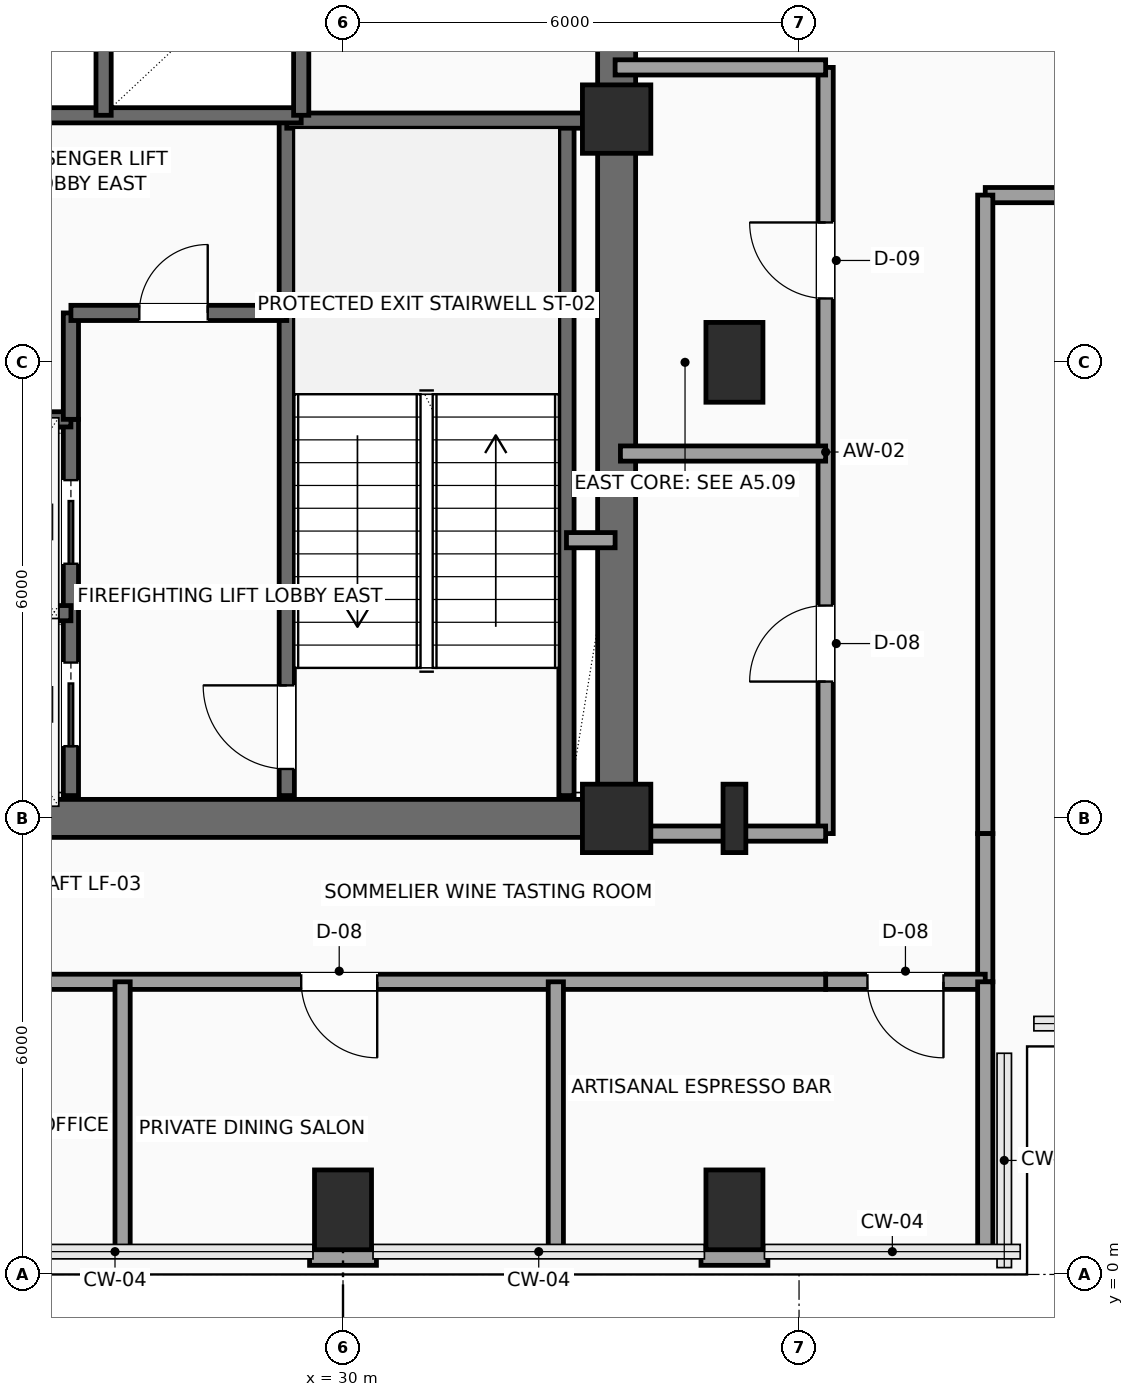
"""IFC4 building model, lengths in metres.
Left out: names, types, materials, properties, quantities, classifications, styles, units other than length and angle.
Written with IfcOpenShell. Run it as: python <this file> out.ifc"""

import sys

from ifc_helpers import new_model, si_unit, direction, frame, frame_2d, origin, origin_2d, place, context, subcontext, project, spatial, rectangle, i_section, extrude, element, fill, save


model = new_model("IFC4")
c1 = context("Model", 3, precision=1e-05, world=origin(), true_north=direction((0.0, 1.0)))
c2 = subcontext(c1, "Body", "Model", "MODEL_VIEW")
j1 = project(units=[si_unit("LENGTHUNIT", "METRE"), si_unit("PLANEANGLEUNIT", "RADIAN")], contexts=[c1])
p1 = place(None, origin())
s1 = spatial("IfcSite", under=j1, at=p1, CompositionType="ELEMENT")
p2 = place(p1, origin())
s2 = spatial("IfcBuilding", under=s1, at=p2, CompositionType="ELEMENT")
p3 = place(p2, frame((0.0, 0.0, 172.95)))
s3 = spatial("IfcBuildingStorey", under=s2, at=p3, CompositionType="ELEMENT", Elevation=172.95)
for number, where, z_axis, x_axis in (
    (1, (33.6, 6.0, 0.0), (0.0, 0.0, 1.0), (1.0, 0.0, 0.0)),
    (2, (33.6, 15.2, 0.0), (0.0, 0.0, 1.0), (1.0, 0.0, 0.0)),
):
    element("IfcColumn", number, at=place(p3, frame(where, z_axis=z_axis, x_axis=x_axis)), inside=s3, PredefinedType="COLUMN", context=c2, shape_type="SweptSolid", body=[
        extrude(rectangle(XDim=0.9, YDim=0.9, at=origin_2d()), origin(), (0.0, 0.0, 1.0), 3.75),
    ])
for number, where, z_axis, x_axis in (
    (3, (30.0, 0.85, 0.0), (0.0, 0.0, 1.0), (1.0, 0.0, 0.0)),
    (4, (35.15, 0.85, 0.0), (0.0, 0.0, 1.0), (1.0, 0.0, 0.0)),
):
    element("IfcColumn", number, at=place(p3, frame(where, z_axis=z_axis, x_axis=x_axis)), inside=s3, PredefinedType="COLUMN", context=c2, shape_type="SweptSolid", body=[
        extrude(rectangle(XDim=0.75, YDim=1.05, at=origin_2d()), origin(), (0.0, 0.0, 1.0), 3.75),
    ])
p4 = place(p3, frame((35.15, 6.0, 0.0), z_axis=(0.0, 0.0, 1.0), x_axis=(1.0, 0.0, 0.0)))
e5 = element("IfcColumn", 5, at=p4, inside=s3, PredefinedType="COLUMN", context=c2, shape_type="SweptSolid", body=[
    extrude(i_section(OverallWidth=0.3, OverallDepth=0.9, WebThickness=0.019, FlangeThickness=0.035, FilletRadius=0.03, at=origin_2d()), origin(), (0.0, 0.0, 1.0), 3.75),
])
p5 = place(p3, frame((35.15, 12.0, 0.0), z_axis=(0.0, 0.0, 1.0), x_axis=(1.0, 0.0, 0.0)))
e6 = element("IfcColumn", 6, at=p5, inside=s3, PredefinedType="COLUMN", context=c2, shape_type="SweptSolid", body=[
    extrude(rectangle(XDim=0.75, YDim=1.05, at=origin_2d()), origin(), (0.0, 0.0, 1.0), 3.75),
])
p6 = place(p3, frame((35.59, 0.24, 0.0), z_axis=(0.0, 0.0, 1.0), x_axis=(-1.0, 0.0, 0.0)))
e7 = element("IfcWall", 7, at=p6, inside=s3, PredefinedType="SOLIDWALL", context=c2, shape_type="SweptSolid", body=[
    extrude(rectangle(XDim=0.88, YDim=0.24, at=frame_2d((0.44, 0.0))), origin(), (0.0, 0.0, 1.0), 3.54),
])
p7 = place(p3, frame((30.44, 0.24, 0.0), z_axis=(0.0, 0.0, 1.0), x_axis=(-1.0, 0.0, 0.0)))
e8 = element("IfcWall", 8, at=p7, inside=s3, PredefinedType="SOLIDWALL", context=c2, shape_type="SweptSolid", body=[
    extrude(rectangle(XDim=0.88, YDim=0.24, at=frame_2d((0.44, 0.0))), origin(), (0.0, 0.0, 1.0), 3.54),
])
p8 = place(p3, frame((24.0, 6.0, 0.0), z_axis=(0.0, 0.0, 1.0), x_axis=(1.0, 0.0, 0.0)))
e9 = element("IfcWall", 9, at=p8, inside=s3, PredefinedType="SHEAR", context=c2, shape_type="SweptSolid", body=[
    extrude(rectangle(XDim=9.6, YDim=0.5, at=frame_2d((4.8, 0.0))), origin(), (0.0, 0.0, 1.0), 3.54),
])
p9 = place(p3, frame((33.6, 6.0, 0.0), z_axis=(0.0, 0.0, 1.0), x_axis=(0.0, 1.0, 0.0)))
e10 = element("IfcWall", 10, at=p9, inside=s3, PredefinedType="SHEAR", context=c2, shape_type="SweptSolid", body=[
    extrude(rectangle(XDim=12.0, YDim=0.5, at=frame_2d((6.0, 0.0))), origin(), (0.0, 0.0, 1.0), 3.54),
])
p10 = place(p9, frame((10.15, 0.0, 0.0)))
e11 = element("IfcOpeningElement", 11, at=p10, cuts=e10, PredefinedType="OPENING", context=c2, shape_type="SweptSolid", body=[
    extrude(rectangle(XDim=0.9, YDim=2.15, at=frame_2d((0.45, 1.075))), frame((0.0, 0.26, 0.0), z_axis=(0.0, -1.0, 0.0), x_axis=(1.0, 0.0, 0.0)), (0.0, 0.0, 1.0), 0.52),
])
p11 = place(p3, frame((29.26, 6.3, 0.0), z_axis=(0.0, 0.0, 1.0), x_axis=(0.0, 1.0, 0.0)))
e12 = element("IfcWall", 12, at=p11, inside=s3, PredefinedType="SHEAR", context=c2, shape_type="SweptSolid", body=[
    extrude(rectangle(XDim=8.88, YDim=0.2, at=frame_2d((4.44, 0.0))), origin(), (0.0, 0.0, 1.0), 3.54),
])
p12 = place(p11, frame((0.35, 0.0, 0.0)))
e13 = element("IfcOpeningElement", 13, at=p12, cuts=e12, PredefinedType="OPENING", context=c2, shape_type="SweptSolid", body=[
    extrude(rectangle(XDim=1.1, YDim=2.2, at=frame_2d((0.55, 1.1))), frame((0.0, 0.11, 0.0), z_axis=(0.0, -1.0, 0.0), x_axis=(1.0, 0.0, 0.0)), (0.0, 0.0, 1.0), 0.22),
])
p13 = place(p3, frame((32.94, 6.3, 0.0), z_axis=(0.0, 0.0, 1.0), x_axis=(0.0, 1.0, 0.0)))
e14 = element("IfcWall", 14, at=p13, inside=s3, PredefinedType="SHEAR", context=c2, shape_type="SweptSolid", body=[
    extrude(rectangle(XDim=8.88, YDim=0.2, at=frame_2d((4.44, 0.0))), origin(), (0.0, 0.0, 1.0), 3.54),
])
p14 = place(p3, frame((29.26, 15.18, 0.0), z_axis=(0.0, 0.0, 1.0), x_axis=(1.0, 0.0, 0.0)))
e15 = element("IfcWall", 15, at=p14, inside=s3, PredefinedType="SHEAR", context=c2, shape_type="SweptSolid", body=[
    extrude(rectangle(XDim=4.04, YDim=0.2, at=frame_2d((2.02, 0.0))), origin(), (0.0, 0.0, 1.0), 3.54),
])
p15 = place(p3, frame((26.42, 6.3, 0.0), z_axis=(0.0, 0.0, 1.0), x_axis=(0.0, 1.0, 0.0)))
e16 = element("IfcWall", 16, at=p15, inside=s3, PredefinedType="SHEAR", context=c2, shape_type="SweptSolid", body=[
    extrude(rectangle(XDim=4.95, YDim=0.2, at=frame_2d((2.475, 0.0))), origin(), (0.0, 0.0, 1.0), 3.54),
])
p16 = place(p15, frame((0.65, 0.0, 0.0)))
e17 = element("IfcOpeningElement", 17, at=p16, cuts=e16, PredefinedType="OPENING", context=c2, shape_type="SweptSolid", body=[
    extrude(rectangle(XDim=1.1, YDim=2.2, at=frame_2d((0.55, 1.1))), frame((0.0, 0.11, 0.0), z_axis=(0.0, -1.0, 0.0), x_axis=(1.0, 0.0, 0.0)), (0.0, 0.0, 1.0), 0.22),
])
p17 = place(p15, frame((3.05, 0.0, 0.0)))
e18 = element("IfcOpeningElement", 18, at=p17, cuts=e16, PredefinedType="OPENING", context=c2, shape_type="SweptSolid", body=[
    extrude(rectangle(XDim=1.1, YDim=2.2, at=frame_2d((0.55, 1.1))), frame((0.0, 0.11, 0.0), z_axis=(0.0, -1.0, 0.0), x_axis=(1.0, 0.0, 0.0)), (0.0, 0.0, 1.0), 0.22),
])
for number, where, z_axis, x_axis in (
    (19, (24.25, 8.7, 0.0), (0.0, 0.0, 1.0), (1.0, 0.0, 0.0)),
    (20, (24.25, 11.25, 0.0), (0.0, 0.0, 1.0), (1.0, 0.0, 0.0)),
):
    element("IfcWall", number, at=place(p3, frame(where, z_axis=z_axis, x_axis=x_axis)), inside=s3, PredefinedType="SHEAR", context=c2, shape_type="SweptSolid", body=[
        extrude(rectangle(XDim=2.17, YDim=0.2, at=frame_2d((1.085, 0.0))), origin(), (0.0, 0.0, 1.0), 3.54),
    ])
p18 = place(p3, frame((26.42, 11.25, 0.0), z_axis=(0.0, 0.0, 1.0), x_axis=(0.0, 1.0, 0.0)))
e21 = element("IfcWall", 21, at=p18, inside=s3, PredefinedType="SHEAR", context=c2, shape_type="SweptSolid", body=[
    extrude(rectangle(XDim=1.4, YDim=0.2, at=frame_2d((0.7, 0.0))), origin(), (0.0, 0.0, 1.0), 3.54),
])
p19 = place(p3, frame((26.42, 12.65, 0.0), z_axis=(0.0, 0.0, 1.0), x_axis=(1.0, 0.0, 0.0)))
e22 = element("IfcWall", 22, at=p19, inside=s3, PredefinedType="SHEAR", context=c2, shape_type="SweptSolid", body=[
    extrude(rectangle(XDim=2.84, YDim=0.2, at=frame_2d((1.42, 0.0))), origin(), (0.0, 0.0, 1.0), 3.54),
])
p20 = place(p19, frame((0.9, 0.0, 0.0)))
e23 = element("IfcOpeningElement", 23, at=p20, cuts=e22, PredefinedType="OPENING", context=c2, shape_type="SweptSolid", body=[
    extrude(rectangle(XDim=0.9, YDim=2.15, at=frame_2d((0.45, 1.075))), frame((0.0, 0.11, 0.0), z_axis=(0.0, -1.0, 0.0), x_axis=(1.0, 0.0, 0.0)), (0.0, 0.0, 1.0), 0.22),
])
p21 = place(p3, frame((32.94, 9.66, 0.0), z_axis=(0.0, 0.0, 1.0), x_axis=(1.0, 0.0, 0.0)))
e24 = element("IfcWall", 24, at=p21, inside=s3, PredefinedType="SOLIDWALL", context=c2, shape_type="SweptSolid", body=[
    extrude(rectangle(XDim=0.64, YDim=0.2, at=frame_2d((0.32, 0.0))), origin(), (0.0, 0.0, 1.0), 3.54),
])
p22 = place(p3, frame((24.25, 15.25, 0.0), z_axis=(0.0, 0.0, 1.0), x_axis=(1.0, 0.0, 0.0)))
e25 = element("IfcWall", 25, at=p22, inside=s3, PredefinedType="SHEAR", context=c2, shape_type="SweptSolid", body=[
    extrude(rectangle(XDim=5.2, YDim=0.2, at=frame_2d((2.6, 0.0))), origin(), (0.0, 0.0, 1.0), 3.54),
])
p23 = place(p3, frame((26.85, 15.25, 0.0), z_axis=(0.0, 0.0, 1.0), x_axis=(0.0, 1.0, 0.0)))
e26 = element("IfcWall", 26, at=p23, inside=s3, PredefinedType="SHEAR", context=c2, shape_type="SweptSolid", body=[
    extrude(rectangle(XDim=2.4, YDim=0.2, at=frame_2d((1.2, 0.0))), origin(), (0.0, 0.0, 1.0), 3.54),
])
p24 = place(p3, frame((29.45, 15.25, 0.0), z_axis=(0.0, 0.0, 1.0), x_axis=(0.0, 1.0, 0.0)))
e27 = element("IfcWall", 27, at=p24, inside=s3, PredefinedType="SHEAR", context=c2, shape_type="SweptSolid", body=[
    extrude(rectangle(XDim=2.45, YDim=0.2, at=frame_2d((1.225, 0.0))), origin(), (0.0, 0.0, 1.0), 3.54),
])
p25 = place(p3, frame((36.35, 5.8, 0.0), z_axis=(0.0, 0.0, 1.0), x_axis=(0.0, 1.0, 0.0)))
e28 = element("IfcWall", 28, at=p25, inside=s3, PredefinedType="PARTITIONING", context=c2, shape_type="SweptSolid", body=[
    extrude(rectangle(XDim=10.08, YDim=0.2, at=frame_2d((5.04, 0.0))), origin(), (0.0, 0.0, 1.0), 3.54),
])
p26 = place(p25, frame((2.0, 0.0, 0.0)))
e29 = element("IfcOpeningElement", 29, at=p26, cuts=e28, PredefinedType="OPENING", context=c2, shape_type="SweptSolid", body=[
    extrude(rectangle(XDim=1.0, YDim=2.2, at=frame_2d((0.5, 1.1))), frame((0.0, 0.11, 0.0), z_axis=(0.0, -1.0, 0.0), x_axis=(1.0, 0.0, 0.0)), (0.0, 0.0, 1.0), 0.22),
])
p27 = place(p25, frame((7.04, 0.0, 0.0)))
e30 = element("IfcOpeningElement", 30, at=p27, cuts=e28, PredefinedType="OPENING", context=c2, shape_type="SweptSolid", body=[
    extrude(rectangle(XDim=1.0, YDim=2.2, at=frame_2d((0.5, 1.1))), frame((0.0, 0.11, 0.0), z_axis=(0.0, -1.0, 0.0), x_axis=(1.0, 0.0, 0.0)), (0.0, 0.0, 1.0), 0.22),
])
p28 = place(p3, frame((36.35, 15.88, 0.0), z_axis=(0.0, 0.0, 1.0), x_axis=(-1.0, 0.0, 0.0)))
e31 = element("IfcWall", 31, at=p28, inside=s3, PredefinedType="PARTITIONING", context=c2, shape_type="SweptSolid", body=[
    extrude(rectangle(XDim=2.77, YDim=0.2, at=frame_2d((1.385, 0.0))), origin(), (0.0, 0.0, 1.0), 3.54),
])
p29 = place(p3, frame((41.7, 14.2, 0.0), z_axis=(0.0, 0.0, 1.0), x_axis=(-1.0, 0.0, 0.0)))
e32 = element("IfcWall", 32, at=p29, inside=s3, PredefinedType="PARTITIONING", context=c2, shape_type="SweptSolid", body=[
    extrude(rectangle(XDim=3.25, YDim=0.2, at=frame_2d((1.625, 0.0))), origin(), (0.0, 0.0, 1.0), 3.54),
])
p30 = place(p3, frame((38.45, 14.2, 0.0), z_axis=(0.0, 0.0, 1.0), x_axis=(0.0, -1.0, 0.0)))
e33 = element("IfcWall", 33, at=p30, inside=s3, PredefinedType="PARTITIONING", context=c2, shape_type="SweptSolid", body=[
    extrude(rectangle(XDim=8.4, YDim=0.2, at=frame_2d((4.2, 0.0))), origin(), (0.0, 0.0, 1.0), 3.54),
])
p31 = place(p3, frame((38.45, 5.8, 0.0), z_axis=(0.0, 0.0, 1.0), x_axis=(0.0, -1.0, 0.0)))
e34 = element("IfcWall", 34, at=p31, inside=s3, PredefinedType="PARTITIONING", context=c2, shape_type="SweptSolid", body=[
    extrude(rectangle(XDim=1.95, YDim=0.2, at=frame_2d((0.975, 0.0))), origin(), (0.0, 0.0, 1.0), 3.54),
])
p32 = place(p3, frame((38.45, 3.85, 0.0), z_axis=(0.0, 0.0, 1.0), x_axis=(-1.0, 0.0, 0.0)))
e35 = element("IfcWall", 35, at=p32, inside=s3, PredefinedType="PARTITIONING", context=c2, shape_type="SweptSolid", body=[
    extrude(rectangle(XDim=2.1, YDim=0.2, at=frame_2d((1.05, 0.0))), origin(), (0.0, 0.0, 1.0), 3.54),
])
p33 = place(p32, frame((0.55, 0.0, 0.0)))
e36 = element("IfcOpeningElement", 36, at=p33, cuts=e35, PredefinedType="OPENING", context=c2, shape_type="SweptSolid", body=[
    extrude(rectangle(XDim=1.0, YDim=2.2, at=frame_2d((0.5, 1.1))), frame((0.0, 0.11, 0.0), z_axis=(0.0, -1.0, 0.0), x_axis=(1.0, 0.0, 0.0)), (0.0, 0.0, 1.0), 0.22),
])
p34 = place(p3, frame((36.35, 3.85, 0.0), z_axis=(0.0, 0.0, 1.0), x_axis=(-1.0, 0.0, 0.0)))
e37 = element("IfcWall", 37, at=p34, inside=s3, PredefinedType="PARTITIONING", context=c2, shape_type="SweptSolid", body=[
    extrude(rectangle(XDim=12.4, YDim=0.2, at=frame_2d((6.2, 0.0))), origin(), (0.0, 0.0, 1.0), 3.54),
])
p35 = place(p34, frame((10.325, 0.0, 0.0)))
e38 = element("IfcOpeningElement", 38, at=p35, cuts=e37, PredefinedType="OPENING", context=c2, shape_type="SweptSolid", body=[
    extrude(rectangle(XDim=1.0, YDim=2.2, at=frame_2d((0.5, 1.1))), frame((0.0, 0.11, 0.0), z_axis=(0.0, -1.0, 0.0), x_axis=(1.0, 0.0, 0.0)), (0.0, 0.0, 1.0), 0.22),
])
p36 = place(p34, frame((5.9, 0.0, 0.0)))
e39 = element("IfcOpeningElement", 39, at=p36, cuts=e37, PredefinedType="OPENING", context=c2, shape_type="SweptSolid", body=[
    extrude(rectangle(XDim=1.0, YDim=2.2, at=frame_2d((0.5, 1.1))), frame((0.0, 0.11, 0.0), z_axis=(0.0, -1.0, 0.0), x_axis=(1.0, 0.0, 0.0)), (0.0, 0.0, 1.0), 0.22),
])
for number, where, z_axis, x_axis in (
    (40, (27.1, 0.3, 0.0), (0.0, 0.0, 1.0), (0.0, 1.0, 0.0)),
    (41, (32.8, 0.3, 0.0), (0.0, 0.0, 1.0), (0.0, 1.0, 0.0)),
    (42, (38.45, 0.3, 0.0), (0.0, 0.0, 1.0), (0.0, 1.0, 0.0)),
):
    element("IfcWall", number, at=place(p3, frame(where, z_axis=z_axis, x_axis=x_axis)), inside=s3, PredefinedType="PARTITIONING", context=c2, shape_type="SweptSolid", body=[
        extrude(rectangle(XDim=3.55, YDim=0.2, at=frame_2d((1.775, 0.0))), origin(), (0.0, 0.0, 1.0), 3.54),
    ])
p37 = place(p3, frame((33.65, 5.8, 0.0), z_axis=(0.0, 0.0, 1.0), x_axis=(1.0, 0.0, 0.0)))
e43 = element("IfcWall", 43, at=p37, inside=s3, PredefinedType="PARTITIONING", context=c2, shape_type="SweptSolid", body=[
    extrude(rectangle(XDim=2.7, YDim=0.2, at=frame_2d((1.35, 0.0))), origin(), (0.0, 0.0, 1.0), 3.132),
])
p38 = place(p3, frame((33.65, 10.8, 0.0), z_axis=(0.0, 0.0, 1.0), x_axis=(1.0, 0.0, 0.0)))
e44 = element("IfcWall", 44, at=p38, inside=s3, PredefinedType="PARTITIONING", context=c2, shape_type="SweptSolid", body=[
    extrude(rectangle(XDim=2.7, YDim=0.2, at=frame_2d((1.35, 0.0))), origin(), (0.0, 0.0, 1.0), 3.54),
])
p39 = place(p12, origin())
e45 = element("IfcDoor", 45, at=p39, inside=s3, OperationType="SINGLE_SWING_RIGHT", PredefinedType="DOOR", context=c2, shape_type="SweptSolid", body=[
    extrude(rectangle(XDim=1.1, YDim=2.2, at=frame_2d((0.55, 1.1))), frame((0.0, 0.025, 0.0), z_axis=(0.0, -1.0, 0.0), x_axis=(1.0, 0.0, 0.0)), (0.0, 0.0, 1.0), 0.05),
])
fill(e13, e45)
p40 = place(p16, origin())
e46 = element("IfcDoor", 46, at=p40, inside=s3, OperationType="SLIDING_TO_LEFT", PredefinedType="DOOR", context=c2, shape_type="SweptSolid", body=[
    extrude(rectangle(XDim=1.1, YDim=2.2, at=frame_2d((0.55, 1.1))), frame((0.0, 0.025, 0.0), z_axis=(0.0, -1.0, 0.0), x_axis=(1.0, 0.0, 0.0)), (0.0, 0.0, 1.0), 0.05),
])
fill(e17, e46)
p41 = place(p17, origin())
e47 = element("IfcDoor", 47, at=p41, inside=s3, OperationType="SLIDING_TO_LEFT", PredefinedType="DOOR", context=c2, shape_type="SweptSolid", body=[
    extrude(rectangle(XDim=1.1, YDim=2.2, at=frame_2d((0.55, 1.1))), frame((0.0, 0.025, 0.0), z_axis=(0.0, -1.0, 0.0), x_axis=(1.0, 0.0, 0.0)), (0.0, 0.0, 1.0), 0.05),
])
fill(e18, e47)
p42 = place(p20, origin())
e48 = element("IfcDoor", 48, at=p42, inside=s3, OperationType="SINGLE_SWING_RIGHT", PredefinedType="DOOR", context=c2, shape_type="SweptSolid", body=[
    extrude(rectangle(XDim=0.9, YDim=2.15, at=frame_2d((0.45, 1.075))), frame((0.0, 0.025, 0.0), z_axis=(0.0, -1.0, 0.0), x_axis=(1.0, 0.0, 0.0)), (0.0, 0.0, 1.0), 0.05),
])
fill(e23, e48)
p43 = place(p26, origin())
e49 = element("IfcDoor", 49, at=p43, inside=s3, OperationType="SINGLE_SWING_LEFT", PredefinedType="DOOR", context=c2, shape_type="SweptSolid", body=[
    extrude(rectangle(XDim=1.0, YDim=2.2, at=frame_2d((0.5, 1.1))), frame((0.0, 0.025, 0.0), z_axis=(0.0, -1.0, 0.0), x_axis=(1.0, 0.0, 0.0)), (0.0, 0.0, 1.0), 0.05),
])
fill(e29, e49)
p44 = place(p27, origin())
e50 = element("IfcDoor", 50, at=p44, inside=s3, OperationType="SINGLE_SWING_RIGHT", PredefinedType="DOOR", context=c2, shape_type="SweptSolid", body=[
    extrude(rectangle(XDim=1.0, YDim=2.2, at=frame_2d((0.5, 1.1))), frame((0.0, 0.025, 0.0), z_axis=(0.0, -1.0, 0.0), x_axis=(1.0, 0.0, 0.0)), (0.0, 0.0, 1.0), 0.05),
])
fill(e30, e50)
p45 = place(p33, origin())
e51 = element("IfcDoor", 51, at=p45, inside=s3, OperationType="SINGLE_SWING_LEFT", PredefinedType="DOOR", context=c2, shape_type="SweptSolid", body=[
    extrude(rectangle(XDim=1.0, YDim=2.2, at=frame_2d((0.5, 1.1))), frame((0.0, 0.025, 0.0), z_axis=(0.0, -1.0, 0.0), x_axis=(1.0, 0.0, 0.0)), (0.0, 0.0, 1.0), 0.05),
])
fill(e36, e51)
p46 = place(p36, origin())
e52 = element("IfcDoor", 52, at=p46, inside=s3, OperationType="SINGLE_SWING_LEFT", PredefinedType="DOOR", context=c2, shape_type="SweptSolid", body=[
    extrude(rectangle(XDim=1.0, YDim=2.2, at=frame_2d((0.5, 1.1))), frame((0.0, 0.025, 0.0), z_axis=(0.0, -1.0, 0.0), x_axis=(1.0, 0.0, 0.0)), (0.0, 0.0, 1.0), 0.05),
])
fill(e39, e52)
save(model, sys.argv[1])
